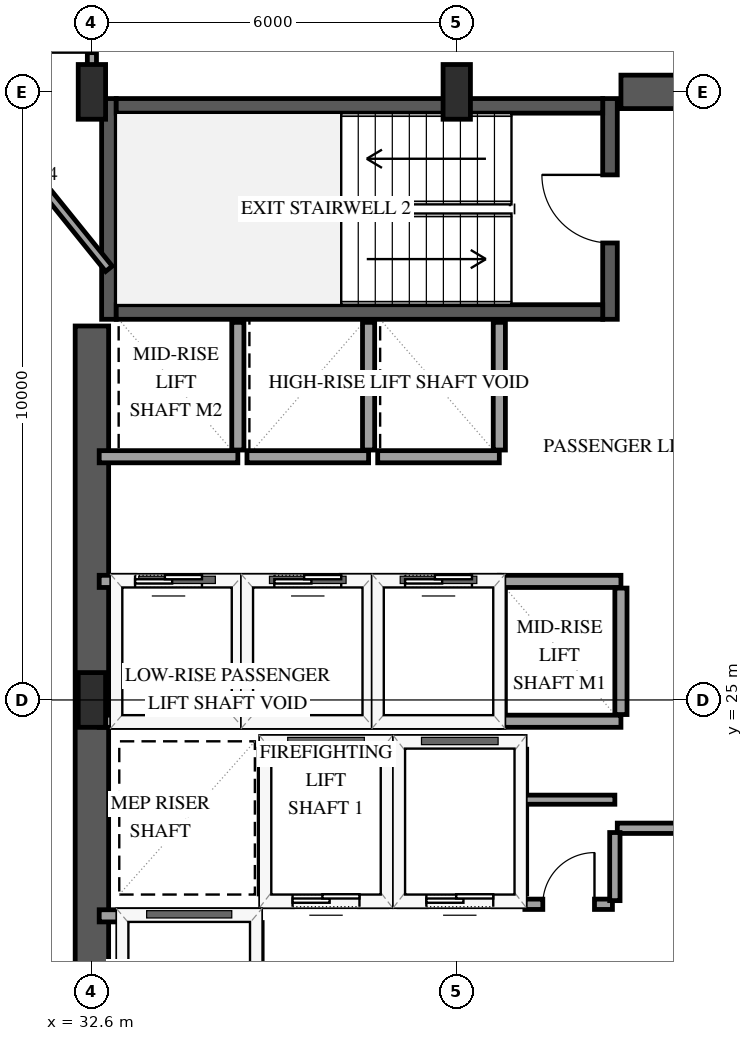
"""IFC4 building model, lengths in metres.
Left out: names, types, materials, properties, quantities, classifications, styles, units other than length and angle.
Written with IfcOpenShell. Run it as: python <this file> out.ifc"""

import sys

from ifc_helpers import new_model, si_unit, direction, frame, frame_2d, origin, origin_2d, place, context, subcontext, project, spatial, rectangle, extrude, element, fill, save


model = new_model("IFC4")
c1 = context("Model", 3, precision=1e-05, world=origin(), true_north=direction((0.0, 1.0)))
c2 = subcontext(c1, "Body", "Model", "MODEL_VIEW")
j1 = project(units=[si_unit("LENGTHUNIT", "METRE"), si_unit("PLANEANGLEUNIT", "RADIAN")], contexts=[c1])
p1 = place(None, origin())
s1 = spatial("IfcSite", under=j1, at=p1, CompositionType="ELEMENT")
p2 = place(p1, origin())
s2 = spatial("IfcBuilding", under=s1, at=p2, CompositionType="ELEMENT")
p3 = place(p2, frame((0.0, 0.0, 122.5)))
s3 = spatial("IfcBuildingStorey", under=s2, at=p3, CompositionType="ELEMENT", Elevation=122.5)
p4 = place(p3, frame((32.88, 31.26, 0.0), z_axis=(0.0, 0.0, 1.0), x_axis=(0.0, 1.0, 0.0)))
e1 = element("IfcWall", 1, at=p4, inside=s3, PredefinedType="SHEAR", context=c2, shape_type="SweptSolid", body=[
    extrude(rectangle(XDim=3.63, YDim=0.24, at=frame_2d((1.815, 0.0))), origin(), (0.0, 0.0, 1.0), 3.9),
])
p5 = place(p3, frame((41.12, 31.26, 0.0), z_axis=(0.0, 0.0, 1.0), x_axis=(0.0, 1.0, 0.0)))
e2 = element("IfcWall", 2, at=p5, inside=s3, PredefinedType="SHEAR", context=c2, shape_type="SweptSolid", body=[
    extrude(rectangle(XDim=3.63, YDim=0.24, at=frame_2d((1.815, 0.0))), origin(), (0.0, 0.0, 1.0), 3.9),
])
p6 = place(p5, frame((1.255, 0.0, 0.0)))
e3 = element("IfcOpeningElement", 3, at=p6, cuts=e2, PredefinedType="OPENING", context=c2, shape_type="SweptSolid", body=[
    extrude(rectangle(XDim=1.12, YDim=2.15, at=frame_2d((0.56, 1.075))), frame((0.0, 0.13, 0.0), z_axis=(0.0, -1.0, 0.0), x_axis=(1.0, 0.0, 0.0)), (0.0, 0.0, 1.0), 0.26),
])
for number, where, z_axis, x_axis in (
    (4, (33.0, 31.38, 0.0), (0.0, 0.0, 1.0), (1.0, 0.0, 0.0)),
    (5, (33.0, 34.77, 0.0), (0.0, 0.0, 1.0), (1.0, 0.0, 0.0)),
):
    element("IfcWall", number, at=place(p3, frame(where, z_axis=z_axis, x_axis=x_axis)), inside=s3, PredefinedType="SHEAR", context=c2, shape_type="SweptSolid", body=[
        extrude(rectangle(XDim=8.0, YDim=0.24, at=frame_2d((4.0, 0.0))), origin(), (0.0, 0.0, 1.0), 3.9),
    ])
p7 = place(p3, frame((32.6, 18.85, 0.0), z_axis=(0.0, 0.0, 1.0), x_axis=(0.0, 1.0, 0.0)))
e6 = element("IfcWall", 6, at=p7, inside=s3, PredefinedType="SHEAR", context=c2, shape_type="SweptSolid", body=[
    extrude(rectangle(XDim=12.3, YDim=0.55, at=frame_2d((6.15, 0.0))), origin(), (0.0, 0.0, 1.0), 3.9),
])
p8 = place(p3, frame((41.3, 35.0, 0.0), z_axis=(0.0, 0.0, 1.0), x_axis=(1.0, 0.0, 0.0)))
e7 = element("IfcWall", 7, at=p8, inside=s3, PredefinedType="SHEAR", context=c2, shape_type="SweptSolid", body=[
    extrude(rectangle(XDim=2.85, YDim=0.55, at=frame_2d((1.425, 0.0))), origin(), (0.0, 0.0, 1.0), 3.9),
])
for number, where, z_axis, x_axis in (
    (8, (32.6, 25.0, 0.0), (0.0, 0.0, 1.0), (1.0, 0.0, 0.0)),
    (9, (32.6, 35.0, 0.0), (0.0, 0.0, 1.0), (1.0, 0.0, 0.0)),
    (10, (38.6, 35.0, 0.0), (0.0, 0.0, 1.0), (1.0, 0.0, 0.0)),
):
    element("IfcColumn", number, at=place(p3, frame(where, z_axis=z_axis, x_axis=x_axis)), inside=s3, PredefinedType="PILASTER", context=c2, shape_type="SweptSolid", body=[
        extrude(rectangle(XDim=0.45, YDim=0.9, at=origin_2d()), origin(), (0.0, 0.0, 1.0), 3.9),
    ])
p9 = place(p3, frame((35.45, 21.7, 0.0), z_axis=(0.0, 0.0, 1.0), x_axis=(1.0, 0.0, 0.0)))
e11 = element("IfcWall", 11, at=p9, inside=s3, PredefinedType="SOLIDWALL", context=c2, shape_type="SweptSolid", body=[
    extrude(rectangle(XDim=2.0, YDim=0.2, at=frame_2d((1.0, 0.0))), origin(), (0.0, 0.0, 1.0), 3.6),
])
p10 = place(p9, frame((0.45, 0.0, 0.0)))
e12 = element("IfcOpeningElement", 12, at=p10, cuts=e11, PredefinedType="OPENING", context=c2, shape_type="SweptSolid", body=[
    extrude(rectangle(XDim=1.1, YDim=2.15, at=frame_2d((0.55, 1.075))), frame((0.0, 0.11, 0.0), z_axis=(0.0, -1.0, 0.0), x_axis=(1.0, 0.0, 0.0)), (0.0, 0.0, 1.0), 0.22),
])
p11 = place(p3, frame((35.45, 24.3, 0.0), z_axis=(0.0, 0.0, 1.0), x_axis=(1.0, 0.0, 0.0)))
e13 = element("IfcWall", 13, at=p11, inside=s3, PredefinedType="SOLIDWALL", context=c2, shape_type="SweptSolid", body=[
    extrude(rectangle(XDim=2.0, YDim=0.2, at=frame_2d((1.0, 0.0))), origin(), (0.0, 0.0, 1.0), 3.6),
])
for number, where, z_axis, x_axis in (
    (14, (35.45, 21.81, 0.0), (0.0, 0.0, 1.0), (0.0, 1.0, 0.0)),
    (15, (37.45, 21.81, 0.0), (0.0, 0.0, 1.0), (0.0, 1.0, 0.0)),
):
    element("IfcWall", number, at=place(p3, frame(where, z_axis=z_axis, x_axis=x_axis)), inside=s3, PredefinedType="SOLIDWALL", context=c2, shape_type="SweptSolid", body=[
        extrude(rectangle(XDim=2.38, YDim=0.2, at=frame_2d((1.19, 0.0))), origin(), (0.0, 0.0, 1.0), 3.6),
    ])
p12 = place(p3, frame((37.65, 21.7, 0.0), z_axis=(0.0, 0.0, 1.0), x_axis=(1.0, 0.0, 0.0)))
e16 = element("IfcWall", 16, at=p12, inside=s3, PredefinedType="SOLIDWALL", context=c2, shape_type="SweptSolid", body=[
    extrude(rectangle(XDim=2.0, YDim=0.2, at=frame_2d((1.0, 0.0))), origin(), (0.0, 0.0, 1.0), 3.6),
])
p13 = place(p12, frame((0.45, 0.0, 0.0)))
e17 = element("IfcOpeningElement", 17, at=p13, cuts=e16, PredefinedType="OPENING", context=c2, shape_type="SweptSolid", body=[
    extrude(rectangle(XDim=1.1, YDim=2.15, at=frame_2d((0.55, 1.075))), frame((0.0, 0.11, 0.0), z_axis=(0.0, -1.0, 0.0), x_axis=(1.0, 0.0, 0.0)), (0.0, 0.0, 1.0), 0.22),
])
p14 = place(p3, frame((37.65, 24.3, 0.0), z_axis=(0.0, 0.0, 1.0), x_axis=(1.0, 0.0, 0.0)))
e18 = element("IfcWall", 18, at=p14, inside=s3, PredefinedType="SOLIDWALL", context=c2, shape_type="SweptSolid", body=[
    extrude(rectangle(XDim=2.0, YDim=0.2, at=frame_2d((1.0, 0.0))), origin(), (0.0, 0.0, 1.0), 3.6),
])
p15 = place(p3, frame((39.65, 21.81, 0.0), z_axis=(0.0, 0.0, 1.0), x_axis=(0.0, 1.0, 0.0)))
e19 = element("IfcWall", 19, at=p15, inside=s3, PredefinedType="SOLIDWALL", context=c2, shape_type="SweptSolid", body=[
    extrude(rectangle(XDim=2.38, YDim=0.2, at=frame_2d((1.19, 0.0))), origin(), (0.0, 0.0, 1.0), 3.6),
])
p16 = place(p3, frame((32.72, 21.45, 0.0), z_axis=(0.0, 0.0, 1.0), x_axis=(1.0, 0.0, 0.0)))
e20 = element("IfcWall", 20, at=p16, inside=s3, PredefinedType="SOLIDWALL", context=c2, shape_type="SweptSolid", body=[
    extrude(rectangle(XDim=2.58, YDim=0.2, at=frame_2d((1.29, 0.0))), origin(), (0.0, 0.0, 1.0), 3.6),
])
p17 = place(p3, frame((35.3, 18.79, 0.0), z_axis=(0.0, 0.0, 1.0), x_axis=(0.0, 1.0, 0.0)))
e21 = element("IfcWall", 21, at=p17, inside=s3, PredefinedType="SOLIDWALL", context=c2, shape_type="SweptSolid", body=[
    extrude(rectangle(XDim=2.55, YDim=0.2, at=frame_2d((1.275, 0.0))), origin(), (0.0, 0.0, 1.0), 3.6),
])
p18 = place(p17, frame((0.725, 0.0, 0.0)))
e22 = element("IfcOpeningElement", 22, at=p18, cuts=e21, PredefinedType="OPENING", context=c2, shape_type="SweptSolid", body=[
    extrude(rectangle(XDim=1.1, YDim=2.15, at=frame_2d((0.55, 1.075))), frame((0.0, 0.11, 0.0), z_axis=(0.0, -1.0, 0.0), x_axis=(1.0, 0.0, 0.0)), (0.0, 0.0, 1.0), 0.22),
])
p19 = place(p3, frame((32.72, 24.65, 0.0), z_axis=(0.0, 0.0, 1.0), x_axis=(1.0, 0.0, 0.0)))
e23 = element("IfcWall", 23, at=p19, inside=s3, PredefinedType="SOLIDWALL", context=c2, shape_type="SweptSolid", body=[
    extrude(rectangle(XDim=2.28, YDim=0.2, at=frame_2d((1.14, 0.0))), origin(), (0.0, 0.0, 1.0), 3.6),
])
p20 = place(p3, frame((32.72, 26.95, 0.0), z_axis=(0.0, 0.0, 1.0), x_axis=(1.0, 0.0, 0.0)))
e24 = element("IfcWall", 24, at=p20, inside=s3, PredefinedType="SOLIDWALL", context=c2, shape_type="SweptSolid", body=[
    extrude(rectangle(XDim=2.28, YDim=0.2, at=frame_2d((1.14, 0.0))), origin(), (0.0, 0.0, 1.0), 3.6),
])
p21 = place(p20, frame((0.59, 0.0, 0.0)))
e25 = element("IfcOpeningElement", 25, at=p21, cuts=e24, PredefinedType="OPENING", context=c2, shape_type="SweptSolid", body=[
    extrude(rectangle(XDim=1.1, YDim=2.15, at=frame_2d((0.55, 1.075))), frame((0.0, 0.11, 0.0), z_axis=(0.0, -1.0, 0.0), x_axis=(1.0, 0.0, 0.0)), (0.0, 0.0, 1.0), 0.22),
])
p22 = place(p3, frame((35.0, 24.76, 0.0), z_axis=(0.0, 0.0, 1.0), x_axis=(0.0, 1.0, 0.0)))
e26 = element("IfcWall", 26, at=p22, inside=s3, PredefinedType="SOLIDWALL", context=c2, shape_type="SweptSolid", body=[
    extrude(rectangle(XDim=2.08, YDim=0.2, at=frame_2d((1.04, 0.0))), origin(), (0.0, 0.0, 1.0), 3.6),
])
p23 = place(p3, frame((35.15, 24.65, 0.0), z_axis=(0.0, 0.0, 1.0), x_axis=(1.0, 0.0, 0.0)))
e27 = element("IfcWall", 27, at=p23, inside=s3, PredefinedType="SOLIDWALL", context=c2, shape_type="SweptSolid", body=[
    extrude(rectangle(XDim=2.0, YDim=0.2, at=frame_2d((1.0, 0.0))), origin(), (0.0, 0.0, 1.0), 3.6),
])
p24 = place(p3, frame((35.15, 26.95, 0.0), z_axis=(0.0, 0.0, 1.0), x_axis=(1.0, 0.0, 0.0)))
e28 = element("IfcWall", 28, at=p24, inside=s3, PredefinedType="SOLIDWALL", context=c2, shape_type="SweptSolid", body=[
    extrude(rectangle(XDim=2.0, YDim=0.2, at=frame_2d((1.0, 0.0))), origin(), (0.0, 0.0, 1.0), 3.6),
])
p25 = place(p24, frame((0.45, 0.0, 0.0)))
e29 = element("IfcOpeningElement", 29, at=p25, cuts=e28, PredefinedType="OPENING", context=c2, shape_type="SweptSolid", body=[
    extrude(rectangle(XDim=1.1, YDim=2.15, at=frame_2d((0.55, 1.075))), frame((0.0, 0.11, 0.0), z_axis=(0.0, -1.0, 0.0), x_axis=(1.0, 0.0, 0.0)), (0.0, 0.0, 1.0), 0.22),
])
p26 = place(p3, frame((37.15, 24.76, 0.0), z_axis=(0.0, 0.0, 1.0), x_axis=(0.0, 1.0, 0.0)))
e30 = element("IfcWall", 30, at=p26, inside=s3, PredefinedType="SOLIDWALL", context=c2, shape_type="SweptSolid", body=[
    extrude(rectangle(XDim=2.08, YDim=0.2, at=frame_2d((1.04, 0.0))), origin(), (0.0, 0.0, 1.0), 3.6),
])
p27 = place(p3, frame((37.3, 24.65, 0.0), z_axis=(0.0, 0.0, 1.0), x_axis=(1.0, 0.0, 0.0)))
e31 = element("IfcWall", 31, at=p27, inside=s3, PredefinedType="SOLIDWALL", context=c2, shape_type="SweptSolid", body=[
    extrude(rectangle(XDim=2.0, YDim=0.2, at=frame_2d((1.0, 0.0))), origin(), (0.0, 0.0, 1.0), 3.6),
])
p28 = place(p3, frame((37.3, 26.95, 0.0), z_axis=(0.0, 0.0, 1.0), x_axis=(1.0, 0.0, 0.0)))
e32 = element("IfcWall", 32, at=p28, inside=s3, PredefinedType="SOLIDWALL", context=c2, shape_type="SweptSolid", body=[
    extrude(rectangle(XDim=2.0, YDim=0.2, at=frame_2d((1.0, 0.0))), origin(), (0.0, 0.0, 1.0), 3.6),
])
p29 = place(p28, frame((0.45, 0.0, 0.0)))
e33 = element("IfcOpeningElement", 33, at=p29, cuts=e32, PredefinedType="OPENING", context=c2, shape_type="SweptSolid", body=[
    extrude(rectangle(XDim=1.1, YDim=2.15, at=frame_2d((0.55, 1.075))), frame((0.0, 0.11, 0.0), z_axis=(0.0, -1.0, 0.0), x_axis=(1.0, 0.0, 0.0)), (0.0, 0.0, 1.0), 0.22),
])
p30 = place(p3, frame((39.3, 24.76, 0.0), z_axis=(0.0, 0.0, 1.0), x_axis=(0.0, 1.0, 0.0)))
e34 = element("IfcWall", 34, at=p30, inside=s3, PredefinedType="SOLIDWALL", context=c2, shape_type="SweptSolid", body=[
    extrude(rectangle(XDim=2.08, YDim=0.2, at=frame_2d((1.04, 0.0))), origin(), (0.0, 0.0, 1.0), 3.6),
])
for number, where, z_axis, x_axis in (
    (35, (39.3, 24.65, 0.0), (0.0, 0.0, 1.0), (1.0, 0.0, 0.0)),
    (36, (39.3, 26.95, 0.0), (0.0, 0.0, 1.0), (1.0, 0.0, 0.0)),
):
    element("IfcWall", number, at=place(p3, frame(where, z_axis=z_axis, x_axis=x_axis)), inside=s3, PredefinedType="SOLIDWALL", context=c2, shape_type="SweptSolid", body=[
        extrude(rectangle(XDim=2.0, YDim=0.2, at=frame_2d((1.0, 0.0))), origin(), (0.0, 0.0, 1.0), 3.6),
    ])
p31 = place(p3, frame((41.3, 24.76, 0.0), z_axis=(0.0, 0.0, 1.0), x_axis=(0.0, 1.0, 0.0)))
e37 = element("IfcWall", 37, at=p31, inside=s3, PredefinedType="SOLIDWALL", context=c2, shape_type="SweptSolid", body=[
    extrude(rectangle(XDim=2.08, YDim=0.2, at=frame_2d((1.04, 0.0))), origin(), (0.0, 0.0, 1.0), 3.6),
])
p32 = place(p3, frame((32.72, 29.0, 0.0), z_axis=(0.0, 0.0, 1.0), x_axis=(1.0, 0.0, 0.0)))
e38 = element("IfcWall", 38, at=p32, inside=s3, PredefinedType="SOLIDWALL", context=c2, shape_type="SweptSolid", body=[
    extrude(rectangle(XDim=2.28, YDim=0.2, at=frame_2d((1.14, 0.0))), origin(), (0.0, 0.0, 1.0), 3.6),
])
p33 = place(p3, frame((35.0, 29.11, 0.0), z_axis=(0.0, 0.0, 1.0), x_axis=(0.0, 1.0, 0.0)))
e39 = element("IfcWall", 39, at=p33, inside=s3, PredefinedType="SOLIDWALL", context=c2, shape_type="SweptSolid", body=[
    extrude(rectangle(XDim=2.1, YDim=0.2, at=frame_2d((1.05, 0.0))), origin(), (0.0, 0.0, 1.0), 3.6),
])
p34 = place(p3, frame((35.15, 29.0, 0.0), z_axis=(0.0, 0.0, 1.0), x_axis=(1.0, 0.0, 0.0)))
e40 = element("IfcWall", 40, at=p34, inside=s3, PredefinedType="SOLIDWALL", context=c2, shape_type="SweptSolid", body=[
    extrude(rectangle(XDim=2.0, YDim=0.2, at=frame_2d((1.0, 0.0))), origin(), (0.0, 0.0, 1.0), 3.6),
])
p35 = place(p3, frame((37.15, 29.11, 0.0), z_axis=(0.0, 0.0, 1.0), x_axis=(0.0, 1.0, 0.0)))
e41 = element("IfcWall", 41, at=p35, inside=s3, PredefinedType="SOLIDWALL", context=c2, shape_type="SweptSolid", body=[
    extrude(rectangle(XDim=2.1, YDim=0.2, at=frame_2d((1.05, 0.0))), origin(), (0.0, 0.0, 1.0), 3.6),
])
p36 = place(p3, frame((37.3, 29.0, 0.0), z_axis=(0.0, 0.0, 1.0), x_axis=(1.0, 0.0, 0.0)))
e42 = element("IfcWall", 42, at=p36, inside=s3, PredefinedType="SOLIDWALL", context=c2, shape_type="SweptSolid", body=[
    extrude(rectangle(XDim=2.0, YDim=0.2, at=frame_2d((1.0, 0.0))), origin(), (0.0, 0.0, 1.0), 3.6),
])
p37 = place(p3, frame((39.3, 29.11, 0.0), z_axis=(0.0, 0.0, 1.0), x_axis=(0.0, 1.0, 0.0)))
e43 = element("IfcWall", 43, at=p37, inside=s3, PredefinedType="SOLIDWALL", context=c2, shape_type="SweptSolid", body=[
    extrude(rectangle(XDim=2.1, YDim=0.2, at=frame_2d((1.05, 0.0))), origin(), (0.0, 0.0, 1.0), 3.6),
])
p38 = place(p3, frame((32.88, 32.091, 0.0), z_axis=(0.0, 0.0, 1.0), x_axis=(-0.627800500923, 0.778374287243, 0.0)))
e44 = element("IfcWall", 44, at=p38, inside=s3, PredefinedType="PARTITIONING", context=c2, shape_type="SweptSolid", body=[
    extrude(rectangle(XDim=3.972, YDim=0.14, at=frame_2d((1.986, 0.0))), origin(), (0.0, 0.0, 1.0), 3.6),
])
p39 = place(p3, frame((41.24, 22.89, 0.0), z_axis=(0.0, 0.0, 1.0), x_axis=(1.0, 0.0, 0.0)))
e45 = element("IfcWall", 45, at=p39, inside=s3, PredefinedType="PARTITIONING", context=c2, shape_type="SweptSolid", body=[
    extrude(rectangle(XDim=3.32, YDim=0.17, at=frame_2d((1.66, 0.0))), origin(), (0.0, 0.0, 1.0), 3.6),
])
p40 = place(p39, frame((1.12, 0.0, 0.0)))
e46 = element("IfcOpeningElement", 46, at=p40, cuts=e45, PredefinedType="OPENING", context=c2, shape_type="SweptSolid", body=[
    extrude(rectangle(XDim=1.08, YDim=2.15, at=frame_2d((0.54, 1.075))), frame((0.0, 0.095, 0.0), z_axis=(0.0, -1.0, 0.0), x_axis=(1.0, 0.0, 0.0)), (0.0, 0.0, 1.0), 0.19),
])
p41 = place(p3, frame((32.6, 35.07, 0.0), z_axis=(0.0, 0.0, 1.0), x_axis=(0.0, 1.0, 0.0)))
e47 = element("IfcWall", 47, at=p41, inside=s3, PredefinedType="PARTITIONING", context=c2, shape_type="SweptSolid", body=[
    extrude(rectangle(XDim=1.91, YDim=0.15, at=frame_2d((0.955, 0.0))), origin(), (0.0, 0.0, 1.0), 3.6),
])
p42 = place(p41, frame((0.575, 0.0, 0.0)))
e48 = element("IfcOpeningElement", 48, at=p42, cuts=e47, PredefinedType="OPENING", context=c2, shape_type="SweptSolid", body=[
    extrude(rectangle(XDim=0.92, YDim=2.12, at=frame_2d((0.46, 1.06))), frame((0.0, 0.085, 0.0), z_axis=(0.0, -1.0, 0.0), x_axis=(1.0, 0.0, 0.0)), (0.0, 0.0, 1.0), 0.17),
])
p43 = place(p3, frame((39.72, 21.64, 0.0), z_axis=(0.0, 0.0, 1.0), x_axis=(1.0, 0.0, 0.0)))
e49 = element("IfcWall", 49, at=p43, inside=s3, PredefinedType="PARTITIONING", context=c2, shape_type="SweptSolid", body=[
    extrude(rectangle(XDim=1.44, YDim=0.17, at=frame_2d((0.72, 0.0))), origin(), (0.0, 0.0, 1.0), 3.6),
])
p44 = place(p43, frame((0.295, 0.0, 0.0)))
e50 = element("IfcOpeningElement", 50, at=p44, cuts=e49, PredefinedType="OPENING", context=c2, shape_type="SweptSolid", body=[
    extrude(rectangle(XDim=0.85, YDim=2.1, at=frame_2d((0.425, 1.05))), frame((0.0, 0.095, 0.0), z_axis=(0.0, -1.0, 0.0), x_axis=(1.0, 0.0, 0.0)), (0.0, 0.0, 1.0), 0.19),
])
p45 = place(p3, frame((41.2, 21.7, 0.0), z_axis=(0.0, 0.0, 1.0), x_axis=(0.0, 1.0, 0.0)))
e51 = element("IfcWall", 51, at=p45, inside=s3, PredefinedType="PARTITIONING", context=c2, shape_type="SweptSolid", body=[
    extrude(rectangle(XDim=1.12, YDim=0.17, at=frame_2d((0.56, 0.0))), origin(), (0.0, 0.0, 1.0), 3.6),
])
p46 = place(p3, frame((41.2, 23.36, 0.0), z_axis=(0.0, 0.0, 1.0), x_axis=(-1.0, 0.0, 0.0)))
e52 = element("IfcWall", 52, at=p46, inside=s3, PredefinedType="PARTITIONING", context=c2, shape_type="SweptSolid", body=[
    extrude(rectangle(XDim=1.48, YDim=0.15, at=frame_2d((0.74, 0.0))), origin(), (0.0, 0.0, 1.0), 3.6),
])
p47 = place(p10, origin())
e53 = element("IfcDoor", 53, at=p47, inside=s3, OperationType="SLIDING_TO_LEFT", PredefinedType="DOOR", context=c2, shape_type="SweptSolid", body=[
    extrude(rectangle(XDim=1.1, YDim=2.15, at=frame_2d((0.55, 1.075))), frame((0.0, 0.025, 0.0), z_axis=(0.0, -1.0, 0.0), x_axis=(1.0, 0.0, 0.0)), (0.0, 0.0, 1.0), 0.05),
])
fill(e12, e53)
p48 = place(p13, origin())
e54 = element("IfcDoor", 54, at=p48, inside=s3, OperationType="SLIDING_TO_LEFT", PredefinedType="DOOR", context=c2, shape_type="SweptSolid", body=[
    extrude(rectangle(XDim=1.1, YDim=2.15, at=frame_2d((0.55, 1.075))), frame((0.0, 0.025, 0.0), z_axis=(0.0, -1.0, 0.0), x_axis=(1.0, 0.0, 0.0)), (0.0, 0.0, 1.0), 0.05),
])
fill(e17, e54)
p49 = place(p21, origin())
e55 = element("IfcDoor", 55, at=p49, inside=s3, OperationType="SLIDING_TO_LEFT", PredefinedType="DOOR", context=c2, shape_type="SweptSolid", body=[
    extrude(rectangle(XDim=1.1, YDim=2.15, at=frame_2d((0.55, 1.075))), frame((0.0, 0.025, 0.0), z_axis=(0.0, -1.0, 0.0), x_axis=(1.0, 0.0, 0.0)), (0.0, 0.0, 1.0), 0.05),
])
fill(e25, e55)
p50 = place(p25, origin())
e56 = element("IfcDoor", 56, at=p50, inside=s3, OperationType="SLIDING_TO_LEFT", PredefinedType="DOOR", context=c2, shape_type="SweptSolid", body=[
    extrude(rectangle(XDim=1.1, YDim=2.15, at=frame_2d((0.55, 1.075))), frame((0.0, 0.025, 0.0), z_axis=(0.0, -1.0, 0.0), x_axis=(1.0, 0.0, 0.0)), (0.0, 0.0, 1.0), 0.05),
])
fill(e29, e56)
p51 = place(p29, origin())
e57 = element("IfcDoor", 57, at=p51, inside=s3, OperationType="SLIDING_TO_LEFT", PredefinedType="DOOR", context=c2, shape_type="SweptSolid", body=[
    extrude(rectangle(XDim=1.1, YDim=2.15, at=frame_2d((0.55, 1.075))), frame((0.0, 0.025, 0.0), z_axis=(0.0, -1.0, 0.0), x_axis=(1.0, 0.0, 0.0)), (0.0, 0.0, 1.0), 0.05),
])
fill(e33, e57)
p52 = place(p6, origin())
e58 = element("IfcDoor", 58, at=p52, inside=s3, OperationType="SINGLE_SWING_RIGHT", PredefinedType="DOOR", context=c2, shape_type="SweptSolid", body=[
    extrude(rectangle(XDim=1.12, YDim=2.15, at=frame_2d((0.56, 1.075))), frame((0.0, 0.025, 0.0), z_axis=(0.0, -1.0, 0.0), x_axis=(1.0, 0.0, 0.0)), (0.0, 0.0, 1.0), 0.05),
])
fill(e3, e58)
p53 = place(p42, origin())
e59 = element("IfcDoor", 59, at=p53, inside=s3, OperationType="SINGLE_SWING_LEFT", PredefinedType="DOOR", context=c2, shape_type="SweptSolid", body=[
    extrude(rectangle(XDim=0.92, YDim=2.12, at=frame_2d((0.46, 1.06))), frame((0.0, 0.025, 0.0), z_axis=(0.0, -1.0, 0.0), x_axis=(1.0, 0.0, 0.0)), (0.0, 0.0, 1.0), 0.05),
])
fill(e48, e59)
p54 = place(p44, origin())
e60 = element("IfcDoor", 60, at=p54, inside=s3, OperationType="SINGLE_SWING_RIGHT", PredefinedType="DOOR", context=c2, shape_type="SweptSolid", body=[
    extrude(rectangle(XDim=0.85, YDim=2.1, at=frame_2d((0.425, 1.05))), frame((0.0, 0.025, 0.0), z_axis=(0.0, -1.0, 0.0), x_axis=(1.0, 0.0, 0.0)), (0.0, 0.0, 1.0), 0.05),
])
fill(e50, e60)
save(model, sys.argv[1])
